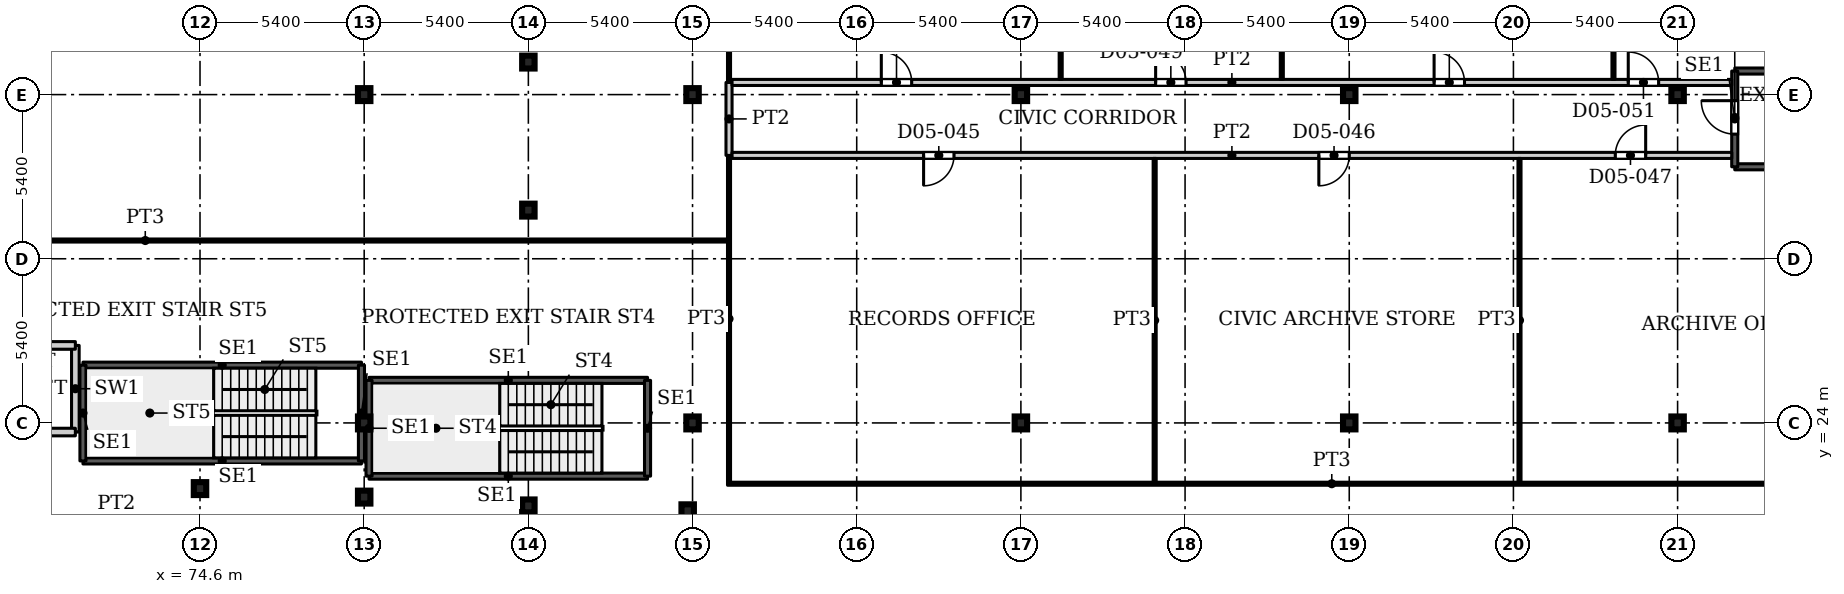
"""IFC4 building model, lengths in metres.
Left out: names, types, materials, properties, quantities, classifications, styles, units other than length and angle.
Written with IfcOpenShell. Run it as: python <this file> out.ifc"""

import sys

from ifc_helpers import new_model, si_unit, direction, frame, frame_2d, origin, origin_2d, place, context, subcontext, project, spatial, rectangle, i_section, extrude, source, transform, mapped, element, fill, save


model = new_model("IFC4")
c1 = context("Model", 3, precision=1e-05, world=origin(), true_north=direction((0.0, 1.0)))
c2 = subcontext(c1, "Body", "Model", "MODEL_VIEW")
j1 = project(units=[si_unit("LENGTHUNIT", "METRE"), si_unit("PLANEANGLEUNIT", "RADIAN")], contexts=[c1])
p1 = place(None, origin())
s1 = spatial("IfcSite", under=j1, at=p1, CompositionType="ELEMENT")
p2 = place(p1, origin())
s2 = spatial("IfcBuilding", under=s1, at=p2, CompositionType="ELEMENT")
p3 = place(p2, frame((0.0, 0.0, 26.0)))
s3 = spatial("IfcBuildingStorey", under=s2, at=p3, CompositionType="ELEMENT", Elevation=26.0)
for number, where, z_axis, x_axis in (
    (1, (80.0, 24.0, 0.0), (0.0, 0.0, 1.0), (1.0, 0.0, 0.0)),
    (2, (90.8, 24.0, 0.0), (0.0, 0.0, 1.0), (1.0, 0.0, 0.0)),
    (3, (101.6, 24.0, 0.0), (0.0, 0.0, 1.0), (1.0, 0.0, 0.0)),
    (4, (112.4, 24.0, 0.0), (0.0, 0.0, 1.0), (1.0, 0.0, 0.0)),
    (5, (123.2, 24.0, 0.0), (0.0, 0.0, 1.0), (1.0, 0.0, 0.0)),
    (6, (80.0, 34.8, 0.0), (0.0, 0.0, 1.0), (1.0, 0.0, 0.0)),
    (7, (90.8, 34.8, 0.0), (0.0, 0.0, 1.0), (1.0, 0.0, 0.0)),
    (8, (101.6, 34.8, 0.0), (0.0, 0.0, 1.0), (1.0, 0.0, 0.0)),
    (9, (112.4, 34.8, 0.0), (0.0, 0.0, 1.0), (1.0, 0.0, 0.0)),
    (10, (123.2, 34.8, 0.0), (0.0, 0.0, 1.0), (1.0, 0.0, 0.0)),
    (11, (90.64, 21.11, 0.0), (0.0, 0.0, 1.0), (1.0, 0.0, 0.0)),
    (12, (85.4, 21.27, 0.0), (0.0, 0.0, 1.0), (1.0, 0.0, 0.0)),
    (13, (80.0, 21.56, 0.0), (0.0, 0.0, 1.0), (1.0, 0.0, 0.0)),
    (14, (74.6, 21.84, 0.0), (0.0, 0.0, 1.0), (1.0, 0.0, 0.0)),
    (15, (85.4, 31.0, 0.0), (0.0, 0.0, 1.0), (1.0, 0.0, 0.0)),
    (16, (85.4, 35.87, 0.0), (0.0, 0.0, 1.0), (1.0, 0.0, 0.0)),
):
    element("IfcColumn", number, at=place(p3, frame(where, z_axis=z_axis, x_axis=x_axis)), inside=s3, PredefinedType="COLUMN", context=c2, shape_type="SweptSolid", body=[
        extrude(i_section(OverallWidth=0.409, OverallDepth=0.425, WebThickness=0.033, FlangeThickness=0.052, FilletRadius=0.013, at=origin_2d()), origin(), (0.0, 0.0, 1.0), 4.5),
    ])
for number, where, z_axis, x_axis in (
    (17, (80.16, 22.25, 0.0), (0.0, 0.0, 1.0), (1.0, 0.0, 0.0)),
    (18, (80.16, 25.4, 0.0), (0.0, 0.0, 1.0), (1.0, 0.0, 0.0)),
):
    element("IfcWall", number, at=place(p3, frame(where, z_axis=z_axis, x_axis=x_axis)), inside=s3, PredefinedType="SHEAR", context=c2, shape_type="SweptSolid", body=[
        extrude(rectangle(XDim=9.16, YDim=0.2, at=frame_2d((4.58, 0.0))), origin(), (0.0, 0.0, 1.0), 4.5),
    ])
for number, where, z_axis, x_axis in (
    (19, (80.16, 22.25, 0.0), (0.0, 0.0, 1.0), (0.0, 1.0, 0.0)),
    (20, (89.32, 22.25, 0.0), (0.0, 0.0, 1.0), (0.0, 1.0, 0.0)),
):
    element("IfcWall", number, at=place(p3, frame(where, z_axis=z_axis, x_axis=x_axis)), inside=s3, PredefinedType="SHEAR", context=c2, shape_type="SweptSolid", body=[
        extrude(rectangle(XDim=3.15, YDim=0.2, at=frame_2d((1.575, 0.0))), origin(), (0.0, 0.0, 1.0), 4.5),
    ])
for number, where, z_axis, x_axis in (
    (21, (70.75, 22.75, 0.0), (0.0, 0.0, 1.0), (1.0, 0.0, 0.0)),
    (22, (70.75, 25.9, 0.0), (0.0, 0.0, 1.0), (1.0, 0.0, 0.0)),
):
    element("IfcWall", number, at=place(p3, frame(where, z_axis=z_axis, x_axis=x_axis)), inside=s3, PredefinedType="SHEAR", context=c2, shape_type="SweptSolid", body=[
        extrude(rectangle(XDim=9.16, YDim=0.2, at=frame_2d((4.58, 0.0))), origin(), (0.0, 0.0, 1.0), 4.5),
    ])
for number, where, z_axis, x_axis in (
    (23, (70.75, 22.75, 0.0), (0.0, 0.0, 1.0), (0.0, 1.0, 0.0)),
    (24, (79.91, 22.75, 0.0), (0.0, 0.0, 1.0), (0.0, 1.0, 0.0)),
):
    element("IfcWall", number, at=place(p3, frame(where, z_axis=z_axis, x_axis=x_axis)), inside=s3, PredefinedType="SHEAR", context=c2, shape_type="SweptSolid", body=[
        extrude(rectangle(XDim=3.15, YDim=0.2, at=frame_2d((1.575, 0.0))), origin(), (0.0, 0.0, 1.0), 4.5),
    ])
p4 = place(p3, frame((70.5, 23.7, 0.0), z_axis=(0.0, 0.0, 1.0), x_axis=(0.0, 1.0, 0.0)))
e25 = element("IfcWall", 25, at=p4, inside=s3, PredefinedType="PARTITIONING", context=c2, shape_type="SweptSolid", body=[
    extrude(rectangle(XDim=2.85, YDim=0.25, at=frame_2d((1.425, 0.0))), origin(), (0.0, 0.0, 1.0), 4.5),
])
for number, where, z_axis, x_axis in (
    (26, (53.4, 23.7, 0.0), (0.0, 0.0, 1.0), (1.0, 0.0, 0.0)),
    (27, (53.4, 26.55, 0.0), (0.0, 0.0, 1.0), (1.0, 0.0, 0.0)),
):
    element("IfcWall", number, at=place(p3, frame(where, z_axis=z_axis, x_axis=x_axis)), inside=s3, PredefinedType="PARTITIONING", context=c2, shape_type="SweptSolid", body=[
        extrude(rectangle(XDim=17.1, YDim=0.25, at=frame_2d((8.55, 0.0))), origin(), (0.0, 0.0, 1.0), 4.5),
    ])
p5 = place(p3, frame((125.08, 32.425, 0.0), z_axis=(0.0, 0.0, 1.0), x_axis=(1.0, 0.0, 0.0)))
e28 = element("IfcWall", 28, at=p5, inside=s3, PredefinedType="SHEAR", context=c2, shape_type="SweptSolid", body=[
    extrude(rectangle(XDim=5.72, YDim=0.2, at=frame_2d((2.86, 0.0))), origin(), (0.0, 0.0, 1.0), 4.5),
])
p6 = place(p3, frame((125.08, 35.575, 0.0), z_axis=(0.0, 0.0, 1.0), x_axis=(1.0, 0.0, 0.0)))
e29 = element("IfcWall", 29, at=p6, inside=s3, PredefinedType="SHEAR", context=c2, shape_type="SweptSolid", body=[
    extrude(rectangle(XDim=6.92, YDim=0.2, at=frame_2d((3.46, 0.0))), origin(), (0.0, 0.0, 1.0), 4.5),
])
p7 = place(p3, frame((125.08, 32.425, 0.0), z_axis=(0.0, 0.0, 1.0), x_axis=(0.0, 1.0, 0.0)))
e30 = element("IfcWall", 30, at=p7, inside=s3, PredefinedType="SHEAR", context=c2, shape_type="SweptSolid", body=[
    extrude(rectangle(XDim=3.15, YDim=0.2, at=frame_2d((1.575, 0.0))), origin(), (0.0, 0.0, 1.0), 4.5),
])
p8 = place(p7, frame((1.075, 0.0, 0.0)))
e31 = element("IfcOpeningElement", 31, at=p8, cuts=e30, PredefinedType="OPENING", context=c2, shape_type="SweptSolid", body=[
    extrude(rectangle(XDim=1.1, YDim=2.2, at=frame_2d((0.55, 1.1))), frame((0.0, 0.11, 0.0), z_axis=(0.0, -1.0, 0.0), x_axis=(1.0, 0.0, 0.0)), (0.0, 0.0, 1.0), 0.22),
])
p9 = place(p3, frame((53.649, 30.0, 0.0), z_axis=(0.0, 0.0, 1.0), x_axis=(1.0, 0.0, 0.0)))
e32 = element("IfcWall", 32, at=p9, inside=s3, PredefinedType="PARTITIONING", context=c2, shape_type="SweptSolid", body=[
    extrude(rectangle(XDim=38.301, YDim=0.1, at=frame_2d((19.15, 0.0))), origin(), (0.0, 0.0, 1.0), 4.2),
])
p10 = place(p3, frame((91.95, 22.0, 0.0), z_axis=(0.0, 0.0, 1.0), x_axis=(1.0, 0.0, 0.0)))
e33 = element("IfcWall", 33, at=p10, inside=s3, PredefinedType="PARTITIONING", context=c2, shape_type="SweptSolid", body=[
    extrude(rectangle(XDim=39.751, YDim=0.1, at=frame_2d((19.875, 0.0))), origin(), (0.0, 0.0, 1.0), 4.2),
])
p11 = place(p3, frame((92.0, 22.05, 0.0), z_axis=(0.0, 0.0, 1.0), x_axis=(0.0, 1.0, 0.0)))
e34 = element("IfcWall", 34, at=p11, inside=s3, PredefinedType="PARTITIONING", context=c2, shape_type="SweptSolid", body=[
    extrude(rectangle(XDim=10.75, YDim=0.1, at=frame_2d((5.375, 0.0))), origin(), (0.0, 0.0, 1.0), 4.2),
])
p12 = place(p3, frame((92.0, 32.8, 0.0), z_axis=(0.0, 0.0, 1.0), x_axis=(0.0, 1.0, 0.0)))
e35 = element("IfcWall", 35, at=p12, inside=s3, PredefinedType="PARTITIONING", context=c2, shape_type="SweptSolid", body=[
    extrude(rectangle(XDim=2.4, YDim=0.2, at=frame_2d((1.2, 0.0))), origin(), (0.0, 0.0, 1.0), 4.2),
])
p13 = place(p3, frame((92.0, 35.2, 0.0), z_axis=(0.0, 0.0, 1.0), x_axis=(0.0, 1.0, 0.0)))
e36 = element("IfcWall", 36, at=p13, inside=s3, PredefinedType="PARTITIONING", context=c2, shape_type="SweptSolid", body=[
    extrude(rectangle(XDim=8.6, YDim=0.1, at=frame_2d((4.3, 0.0))), origin(), (0.0, 0.0, 1.0), 4.2),
])
p14 = place(p3, frame((92.1, 32.8, 0.0), z_axis=(0.0, 0.0, 1.0), x_axis=(1.0, 0.0, 0.0)))
e37 = element("IfcWall", 37, at=p14, inside=s3, PredefinedType="PARTITIONING", context=c2, shape_type="SweptSolid", body=[
    extrude(rectangle(XDim=32.881, YDim=0.2, at=frame_2d((16.44, 0.0))), origin(), (0.0, 0.0, 1.0), 4.2),
])
p15 = place(p14, frame((6.3, 0.0, 0.0)))
e38 = element("IfcOpeningElement", 38, at=p15, cuts=e37, PredefinedType="OPENING", context=c2, shape_type="SweptSolid", body=[
    extrude(rectangle(XDim=1.0, YDim=2.1, at=frame_2d((0.5, 1.05))), frame((0.0, 0.11, 0.0), z_axis=(0.0, -1.0, 0.0), x_axis=(1.0, 0.0, 0.0)), (0.0, 0.0, 1.0), 0.22),
])
p16 = place(p14, frame((19.3, 0.0, 0.0)))
e39 = element("IfcOpeningElement", 39, at=p16, cuts=e37, PredefinedType="OPENING", context=c2, shape_type="SweptSolid", body=[
    extrude(rectangle(XDim=1.0, YDim=2.1, at=frame_2d((0.5, 1.05))), frame((0.0, 0.11, 0.0), z_axis=(0.0, -1.0, 0.0), x_axis=(1.0, 0.0, 0.0)), (0.0, 0.0, 1.0), 0.22),
])
p17 = place(p14, frame((29.05, 0.0, 0.0)))
e40 = element("IfcOpeningElement", 40, at=p17, cuts=e37, PredefinedType="OPENING", context=c2, shape_type="SweptSolid", body=[
    extrude(rectangle(XDim=1.0, YDim=2.1, at=frame_2d((0.5, 1.05))), frame((0.0, 0.11, 0.0), z_axis=(0.0, -1.0, 0.0), x_axis=(1.0, 0.0, 0.0)), (0.0, 0.0, 1.0), 0.22),
])
p18 = place(p3, frame((92.1, 35.2, 0.0), z_axis=(0.0, 0.0, 1.0), x_axis=(1.0, 0.0, 0.0)))
e41 = element("IfcWall", 41, at=p18, inside=s3, PredefinedType="PARTITIONING", context=c2, shape_type="SweptSolid", body=[
    extrude(rectangle(XDim=32.88, YDim=0.2, at=frame_2d((16.44, 0.0))), origin(), (0.0, 0.0, 1.0), 4.2),
])
p19 = place(p18, frame((4.909, 0.0, 0.0)))
e42 = element("IfcOpeningElement", 42, at=p19, cuts=e41, PredefinedType="OPENING", context=c2, shape_type="SweptSolid", body=[
    extrude(rectangle(XDim=1.0, YDim=2.1, at=frame_2d((0.5, 1.05))), frame((0.0, 0.11, 0.0), z_axis=(0.0, -1.0, 0.0), x_axis=(1.0, 0.0, 0.0)), (0.0, 0.0, 1.0), 0.22),
])
p20 = place(p18, frame((13.932, 0.0, 0.0)))
e43 = element("IfcOpeningElement", 43, at=p20, cuts=e41, PredefinedType="OPENING", context=c2, shape_type="SweptSolid", body=[
    extrude(rectangle(XDim=1.0, YDim=2.1, at=frame_2d((0.5, 1.05))), frame((0.0, 0.11, 0.0), z_axis=(0.0, -1.0, 0.0), x_axis=(1.0, 0.0, 0.0)), (0.0, 0.0, 1.0), 0.22),
])
p21 = place(p18, frame((23.091, 0.0, 0.0)))
e44 = element("IfcOpeningElement", 44, at=p21, cuts=e41, PredefinedType="OPENING", context=c2, shape_type="SweptSolid", body=[
    extrude(rectangle(XDim=1.0, YDim=2.1, at=frame_2d((0.5, 1.05))), frame((0.0, 0.11, 0.0), z_axis=(0.0, -1.0, 0.0), x_axis=(1.0, 0.0, 0.0)), (0.0, 0.0, 1.0), 0.22),
])
p22 = place(p18, frame((29.477, 0.0, 0.0)))
e45 = element("IfcOpeningElement", 45, at=p22, cuts=e41, PredefinedType="OPENING", context=c2, shape_type="SweptSolid", body=[
    extrude(rectangle(XDim=1.0, YDim=2.1, at=frame_2d((0.5, 1.05))), frame((0.0, 0.11, 0.0), z_axis=(0.0, -1.0, 0.0), x_axis=(1.0, 0.0, 0.0)), (0.0, 0.0, 1.0), 0.22),
])
p23 = place(p3, frame((102.909, 35.3, 0.0), z_axis=(0.0, 0.0, 1.0), x_axis=(0.0, 1.0, 0.0)))
e46 = element("IfcWall", 46, at=p23, inside=s3, PredefinedType="PARTITIONING", context=c2, shape_type="SweptSolid", body=[
    extrude(rectangle(XDim=12.65, YDim=0.1, at=frame_2d((6.325, 0.0))), origin(), (0.0, 0.0, 1.0), 4.2),
])
p24 = place(p3, frame((106.0, 22.05, 0.0), z_axis=(0.0, 0.0, 1.0), x_axis=(0.0, 1.0, 0.0)))
e47 = element("IfcWall", 47, at=p24, inside=s3, PredefinedType="PARTITIONING", context=c2, shape_type="SweptSolid", body=[
    extrude(rectangle(XDim=10.65, YDim=0.1, at=frame_2d((5.325, 0.0))), origin(), (0.0, 0.0, 1.0), 4.2),
])
p25 = place(p3, frame((110.182, 35.3, 0.0), z_axis=(0.0, 0.0, 1.0), x_axis=(0.0, 1.0, 0.0)))
e48 = element("IfcWall", 48, at=p25, inside=s3, PredefinedType="PARTITIONING", context=c2, shape_type="SweptSolid", body=[
    extrude(rectangle(XDim=12.65, YDim=0.1, at=frame_2d((6.325, 0.0))), origin(), (0.0, 0.0, 1.0), 4.2),
])
p26 = place(p3, frame((118.0, 22.05, 0.0), z_axis=(0.0, 0.0, 1.0), x_axis=(0.0, 1.0, 0.0)))
e49 = element("IfcWall", 49, at=p26, inside=s3, PredefinedType="PARTITIONING", context=c2, shape_type="SweptSolid", body=[
    extrude(rectangle(XDim=10.65, YDim=0.1, at=frame_2d((5.325, 0.0))), origin(), (0.0, 0.0, 1.0), 4.2),
])
p27 = place(p3, frame((121.091, 35.3, 0.0), z_axis=(0.0, 0.0, 1.0), x_axis=(0.0, 1.0, 0.0)))
e50 = element("IfcWall", 50, at=p27, inside=s3, PredefinedType="PARTITIONING", context=c2, shape_type="SweptSolid", body=[
    extrude(rectangle(XDim=8.638, YDim=0.1, at=frame_2d((4.319, 0.0))), origin(), (0.0, 0.0, 1.0), 4.2),
])
m1 = source(origin(), c2, "Body", "SweptSolid", [
    extrude(rectangle(XDim=1.1, YDim=2.2, at=frame_2d((0.55, 1.1))), frame((0.0, 0.025, 0.0), z_axis=(0.0, -1.0, 0.0), x_axis=(1.0, 0.0, 0.0)), (0.0, 0.0, 1.0), 0.05),
])
p28 = place(p8, origin())
e51 = element("IfcDoor", 51, at=p28, inside=s3, OperationType="SINGLE_SWING_LEFT", PredefinedType="DOOR", context=c2, shape_type="MappedRepresentation", body=[
    mapped(m1, transform((0.0, 0.0, 0.0), x_axis=(1.0, 0.0, 0.0), y_axis=(0.0, 1.0, 0.0), z_axis=(0.0, 0.0, 1.0), scale=1.0)),
])
fill(e31, e51)
m2 = source(origin(), c2, "Body", "SweptSolid", [
    extrude(rectangle(XDim=1.0, YDim=2.1, at=frame_2d((0.5, 1.05))), frame((0.0, 0.025, 0.0), z_axis=(0.0, -1.0, 0.0), x_axis=(1.0, 0.0, 0.0)), (0.0, 0.0, 1.0), 0.05),
])
p29 = place(p15, origin())
e52 = element("IfcDoor", 52, at=p29, inside=s3, OperationType="SINGLE_SWING_RIGHT", PredefinedType="DOOR", context=c2, shape_type="MappedRepresentation", body=[
    mapped(m2, transform((0.0, 0.0, 0.0), x_axis=(1.0, 0.0, 0.0), y_axis=(0.0, 1.0, 0.0), z_axis=(0.0, 0.0, 1.0), scale=1.0)),
])
fill(e38, e52)
p30 = place(p16, origin())
e53 = element("IfcDoor", 53, at=p30, inside=s3, OperationType="SINGLE_SWING_RIGHT", PredefinedType="DOOR", context=c2, shape_type="MappedRepresentation", body=[
    mapped(m2, transform((0.0, 0.0, 0.0), x_axis=(1.0, 0.0, 0.0), y_axis=(0.0, 1.0, 0.0), z_axis=(0.0, 0.0, 1.0), scale=1.0)),
])
fill(e39, e53)
p31 = place(p17, origin())
e54 = element("IfcDoor", 54, at=p31, inside=s3, OperationType="SINGLE_SWING_LEFT", PredefinedType="DOOR", context=c2, shape_type="MappedRepresentation", body=[
    mapped(m2, transform((0.0, 0.0, 0.0), x_axis=(1.0, 0.0, 0.0), y_axis=(0.0, 1.0, 0.0), z_axis=(0.0, 0.0, 1.0), scale=1.0)),
])
fill(e40, e54)
p32 = place(p19, origin())
e55 = element("IfcDoor", 55, at=p32, inside=s3, OperationType="SINGLE_SWING_LEFT", PredefinedType="DOOR", context=c2, shape_type="MappedRepresentation", body=[
    mapped(m2, transform((0.0, 0.0, 0.0), x_axis=(1.0, 0.0, 0.0), y_axis=(0.0, 1.0, 0.0), z_axis=(0.0, 0.0, 1.0), scale=1.0)),
])
fill(e42, e55)
p33 = place(p20, origin())
e56 = element("IfcDoor", 56, at=p33, inside=s3, OperationType="SINGLE_SWING_LEFT", PredefinedType="DOOR", context=c2, shape_type="MappedRepresentation", body=[
    mapped(m2, transform((0.0, 0.0, 0.0), x_axis=(1.0, 0.0, 0.0), y_axis=(0.0, 1.0, 0.0), z_axis=(0.0, 0.0, 1.0), scale=1.0)),
])
fill(e43, e56)
p34 = place(p21, origin())
e57 = element("IfcDoor", 57, at=p34, inside=s3, OperationType="SINGLE_SWING_LEFT", PredefinedType="DOOR", context=c2, shape_type="MappedRepresentation", body=[
    mapped(m2, transform((0.0, 0.0, 0.0), x_axis=(1.0, 0.0, 0.0), y_axis=(0.0, 1.0, 0.0), z_axis=(0.0, 0.0, 1.0), scale=1.0)),
])
fill(e44, e57)
p35 = place(p22, origin())
e58 = element("IfcDoor", 58, at=p35, inside=s3, OperationType="SINGLE_SWING_LEFT", PredefinedType="DOOR", context=c2, shape_type="MappedRepresentation", body=[
    mapped(m2, transform((0.0, 0.0, 0.0), x_axis=(1.0, 0.0, 0.0), y_axis=(0.0, 1.0, 0.0), z_axis=(0.0, 0.0, 1.0), scale=1.0)),
])
fill(e45, e58)
save(model, sys.argv[1])
